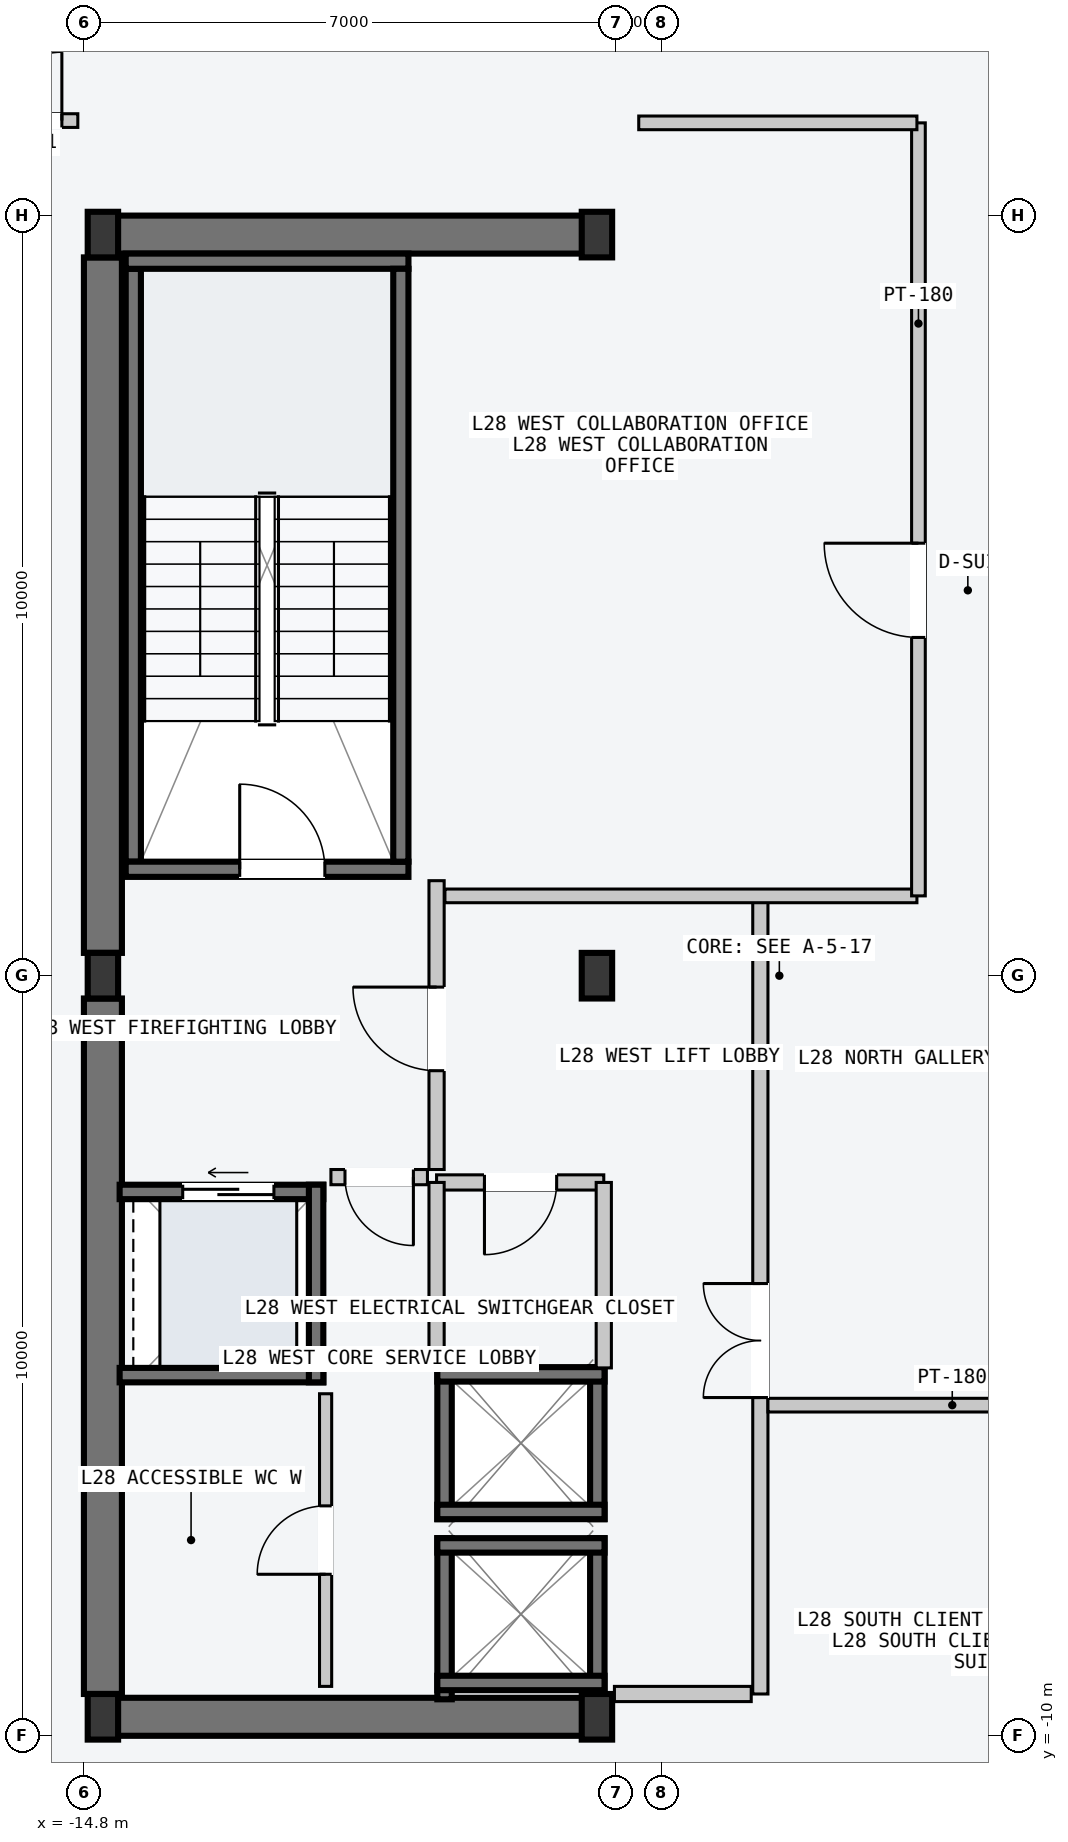
"""IFC4 building model, lengths in metres.
Left out: names, types, materials, properties, quantities, classifications, styles, units other than length and angle.
Written with IfcOpenShell. Run it as: python <this file> out.ifc"""

import sys

from ifc_helpers import new_model, si_unit, direction, frame, frame_2d, origin, origin_2d, place, context, subcontext, project, spatial, rectangle, i_section, extrude, element, fill, save


model = new_model("IFC4")
c1 = context("Model", 3, precision=1e-05, world=origin(), true_north=direction((0.0, 1.0)))
c2 = subcontext(c1, "Body", "Model", "MODEL_VIEW")
j1 = project(units=[si_unit("LENGTHUNIT", "METRE"), si_unit("PLANEANGLEUNIT", "RADIAN")], contexts=[c1])
p1 = place(None, origin())
s1 = spatial("IfcSite", under=j1, at=p1, CompositionType="ELEMENT")
p2 = place(p1, origin())
s2 = spatial("IfcBuilding", under=s1, at=p2, CompositionType="ELEMENT")
p3 = place(p2, frame((0.0, 0.0, 109.8)))
s3 = spatial("IfcBuildingStorey", under=s2, at=p3, CompositionType="ELEMENT", Elevation=109.8)
for number, where, z_axis, x_axis in (
    (1, (-14.53, -9.75, -0.2), (0.0, 0.0, 1.0), (1.0, 0.0, 0.0)),
    (2, (-14.53, 9.75, -0.2), (0.0, 0.0, 1.0), (1.0, 0.0, 0.0)),
):
    element("IfcWall", number, at=place(p3, frame(where, z_axis=z_axis, x_axis=x_axis)), inside=s3, PredefinedType="SHEAR", context=c2, shape_type="SweptSolid", body=[
        extrude(rectangle(XDim=6.46, YDim=0.5, at=frame_2d((3.23, 0.0))), origin(), (0.0, 0.0, 1.0), 3.6),
    ])
for number, where, z_axis, x_axis in (
    (3, (-14.55, -9.45, -0.2), (0.0, 0.0, 1.0), (0.0, 1.0, 0.0)),
    (4, (-14.55, 0.3, -0.2), (0.0, 0.0, 1.0), (0.0, 1.0, 0.0)),
):
    element("IfcWall", number, at=place(p3, frame(where, z_axis=z_axis, x_axis=x_axis)), inside=s3, PredefinedType="SHEAR", context=c2, shape_type="SweptSolid", body=[
        extrude(rectangle(XDim=9.15, YDim=0.5, at=frame_2d((4.575, 0.0))), origin(), (0.0, 0.0, 1.0), 3.6),
    ])
p4 = place(p3, frame((-14.15, 1.5, -0.2), z_axis=(0.0, 0.0, 1.0), x_axis=(0.0, 1.0, 0.0)))
e5 = element("IfcWall", 5, at=p4, inside=s3, PredefinedType="SOLIDWALL", context=c2, shape_type="SweptSolid", body=[
    extrude(rectangle(XDim=7.8, YDim=0.2, at=frame_2d((3.9, 0.0))), origin(), (0.0, 0.0, 1.0), 3.6),
])
p5 = place(p3, frame((-14.25, 1.4, -0.2), z_axis=(0.0, 0.0, 1.0), x_axis=(1.0, 0.0, 0.0)))
e6 = element("IfcWall", 6, at=p5, inside=s3, PredefinedType="SOLIDWALL", context=c2, shape_type="SweptSolid", body=[
    extrude(rectangle(XDim=3.72, YDim=0.2, at=frame_2d((1.86, 0.0))), origin(), (0.0, 0.0, 1.0), 3.6),
])
p6 = place(p5, frame((1.5, 0.0, 0.2)))
e7 = element("IfcOpeningElement", 7, at=p6, cuts=e6, PredefinedType="OPENING", context=c2, shape_type="SweptSolid", body=[
    extrude(rectangle(XDim=1.12, YDim=2.18, at=frame_2d((0.56, 1.09))), frame((0.0, 0.11, 0.0), z_axis=(0.0, -1.0, 0.0), x_axis=(1.0, 0.0, 0.0)), (0.0, 0.0, 1.0), 0.22),
])
p7 = place(p3, frame((-14.25, 9.4, -0.2), z_axis=(0.0, 0.0, 1.0), x_axis=(1.0, 0.0, 0.0)))
e8 = element("IfcWall", 8, at=p7, inside=s3, PredefinedType="SOLIDWALL", context=c2, shape_type="SweptSolid", body=[
    extrude(rectangle(XDim=3.72, YDim=0.2, at=frame_2d((1.86, 0.0))), origin(), (0.0, 0.0, 1.0), 3.6),
])
p8 = place(p3, frame((-10.63, 1.5, -0.2), z_axis=(0.0, 0.0, 1.0), x_axis=(0.0, 1.0, 0.0)))
e9 = element("IfcWall", 9, at=p8, inside=s3, PredefinedType="SOLIDWALL", context=c2, shape_type="SweptSolid", body=[
    extrude(rectangle(XDim=7.8, YDim=0.2, at=frame_2d((3.9, 0.0))), origin(), (0.0, 0.0, 1.0), 3.6),
])
for number, where, z_axis, x_axis in (
    (10, (-14.55, -9.75, 0.0), (0.0, 0.0, 1.0), (1.0, 0.0, 0.0)),
    (11, (-14.55, 0.0, 0.0), (0.0, 0.0, 1.0), (1.0, 0.0, 0.0)),
    (12, (-14.55, 9.75, 0.0), (0.0, 0.0, 1.0), (1.0, 0.0, 0.0)),
    (13, (-8.05, -9.75, 0.0), (0.0, 0.0, 1.0), (1.0, 0.0, 0.0)),
    (14, (-8.05, 0.0, 0.0), (0.0, 0.0, 1.0), (1.0, 0.0, 0.0)),
    (15, (-8.05, 9.75, 0.0), (0.0, 0.0, 1.0), (1.0, 0.0, 0.0)),
):
    element("IfcColumn", number, at=place(p3, frame(where, z_axis=z_axis, x_axis=x_axis)), inside=s3, PredefinedType="COLUMN", context=c2, shape_type="SweptSolid", body=[
        extrude(i_section(OverallWidth=0.4, OverallDepth=0.6, WebThickness=0.022, FlangeThickness=0.036, at=origin_2d()), origin(), (0.0, 0.0, 1.0), 3.6),
    ])
for number, where, z_axis, x_axis in (
    (16, (-8.045, -9.52, -0.2), (0.0, 0.0, 1.0), (0.0, 1.0, 0.0)),
    (17, (-10.055, -9.52, -0.2), (0.0, 0.0, 1.0), (0.0, 1.0, 0.0)),
):
    element("IfcWall", number, at=place(p3, frame(where, z_axis=z_axis, x_axis=x_axis)), inside=s3, PredefinedType="SOLIDWALL", context=c2, shape_type="SweptSolid", body=[
        extrude(rectangle(XDim=2.12, YDim=0.19, at=frame_2d((1.06, 0.0))), origin(), (0.0, 0.0, 1.0), 3.6),
    ])
for number, where, z_axis, x_axis in (
    (18, (-10.15, -7.495, -0.2), (0.0, 0.0, 1.0), (1.0, 0.0, 0.0)),
    (19, (-10.15, -9.305, -0.2), (0.0, 0.0, 1.0), (1.0, 0.0, 0.0)),
):
    element("IfcWall", number, at=place(p3, frame(where, z_axis=z_axis, x_axis=x_axis)), inside=s3, PredefinedType="SOLIDWALL", context=c2, shape_type="SweptSolid", body=[
        extrude(rectangle(XDim=2.2, YDim=0.19, at=frame_2d((1.1, 0.0))), origin(), (0.0, 0.0, 1.0), 3.6),
    ])
for number, where, z_axis, x_axis in (
    (20, (-8.045, -7.15, -0.2), (0.0, 0.0, 1.0), (0.0, 1.0, 0.0)),
    (21, (-10.055, -7.15, -0.2), (0.0, 0.0, 1.0), (0.0, 1.0, 0.0)),
):
    element("IfcWall", number, at=place(p3, frame(where, z_axis=z_axis, x_axis=x_axis)), inside=s3, PredefinedType="SOLIDWALL", context=c2, shape_type="SweptSolid", body=[
        extrude(rectangle(XDim=2.0, YDim=0.19, at=frame_2d((1.0, 0.0))), origin(), (0.0, 0.0, 1.0), 3.6),
    ])
for number, where, z_axis, x_axis in (
    (22, (-10.15, -5.245, -0.2), (0.0, 0.0, 1.0), (1.0, 0.0, 0.0)),
    (23, (-10.15, -7.055, -0.2), (0.0, 0.0, 1.0), (1.0, 0.0, 0.0)),
):
    element("IfcWall", number, at=place(p3, frame(where, z_axis=z_axis, x_axis=x_axis)), inside=s3, PredefinedType="SOLIDWALL", context=c2, shape_type="SweptSolid", body=[
        extrude(rectangle(XDim=2.2, YDim=0.19, at=frame_2d((1.1, 0.0))), origin(), (0.0, 0.0, 1.0), 3.6),
    ])
p9 = place(p3, frame((-14.33, -2.845, -0.2), z_axis=(0.0, 0.0, 1.0), x_axis=(1.0, 0.0, 0.0)))
e24 = element("IfcWall", 24, at=p9, inside=s3, PredefinedType="SOLIDWALL", context=c2, shape_type="SweptSolid", body=[
    extrude(rectangle(XDim=2.68, YDim=0.19, at=frame_2d((1.34, 0.0))), origin(), (0.0, 0.0, 1.0), 3.6),
])
p10 = place(p9, frame((0.83, 0.0, 0.2)))
e25 = element("IfcOpeningElement", 25, at=p10, cuts=e24, PredefinedType="OPENING", context=c2, shape_type="SweptSolid", body=[
    extrude(rectangle(XDim=1.2, YDim=2.2, at=frame_2d((0.6, 1.1))), frame((0.0, 0.105, 0.0), z_axis=(0.0, -1.0, 0.0), x_axis=(1.0, 0.0, 0.0)), (0.0, 0.0, 1.0), 0.21),
])
p11 = place(p3, frame((-14.33, -5.255, -0.2), z_axis=(0.0, 0.0, 1.0), x_axis=(1.0, 0.0, 0.0)))
e26 = element("IfcWall", 26, at=p11, inside=s3, PredefinedType="SOLIDWALL", context=c2, shape_type="SweptSolid", body=[
    extrude(rectangle(XDim=2.68, YDim=0.19, at=frame_2d((1.34, 0.0))), origin(), (0.0, 0.0, 1.0), 3.6),
])
p12 = place(p3, frame((-11.745, -5.35, -0.2), z_axis=(0.0, 0.0, 1.0), x_axis=(0.0, 1.0, 0.0)))
e27 = element("IfcWall", 27, at=p12, inside=s3, PredefinedType="SOLIDWALL", context=c2, shape_type="SweptSolid", body=[
    extrude(rectangle(XDim=2.6, YDim=0.19, at=frame_2d((1.3, 0.0))), origin(), (0.0, 0.0, 1.0), 3.6),
])
p13 = place(p3, frame((-5.9, -9.45, 0.0), z_axis=(0.0, 0.0, 1.0), x_axis=(0.0, 1.0, 0.0)))
e28 = element("IfcWall", 28, at=p13, inside=s3, PredefinedType="PARTITIONING", context=c2, shape_type="SweptSolid", body=[
    extrude(rectangle(XDim=10.5, YDim=0.2, at=frame_2d((5.25, 0.0))), origin(), (0.0, 0.0, 1.0), 3.4),
])
p14 = place(p13, frame((3.9, 0.0, 0.0)))
e29 = element("IfcOpeningElement", 29, at=p14, cuts=e28, PredefinedType="OPENING", context=c2, shape_type="SweptSolid", body=[
    extrude(rectangle(XDim=1.5, YDim=2.2, at=frame_2d((0.75, 1.1))), frame((0.0, 0.11, 0.0), z_axis=(0.0, -1.0, 0.0), x_axis=(1.0, 0.0, 0.0)), (0.0, 0.0, 1.0), 0.22),
])
p15 = place(p3, frame((-6.02, -9.45, 0.0), z_axis=(0.0, 0.0, 1.0), x_axis=(-1.0, 0.0, 0.0)))
e30 = element("IfcWall", 30, at=p15, inside=s3, PredefinedType="PARTITIONING", context=c2, shape_type="SweptSolid", body=[
    extrude(rectangle(XDim=1.8, YDim=0.2, at=frame_2d((0.9, 0.0))), origin(), (0.0, 0.0, 1.0), 3.4),
])
p16 = place(p3, frame((-10.16, -2.55, 0.0), z_axis=(0.0, 0.0, 1.0), x_axis=(0.0, 1.0, 0.0)))
e31 = element("IfcWall", 31, at=p16, inside=s3, PredefinedType="PARTITIONING", context=c2, shape_type="SweptSolid", body=[
    extrude(rectangle(XDim=3.8, YDim=0.2, at=frame_2d((1.9, 0.0))), origin(), (0.0, 0.0, 1.0), 3.4),
])
p17 = place(p16, frame((1.3, 0.0, 0.0)))
e32 = element("IfcOpeningElement", 32, at=p17, cuts=e31, PredefinedType="OPENING", context=c2, shape_type="SweptSolid", body=[
    extrude(rectangle(XDim=1.1, YDim=2.15, at=frame_2d((0.55, 1.075))), frame((0.0, 0.11, 0.0), z_axis=(0.0, -1.0, 0.0), x_axis=(1.0, 0.0, 0.0)), (0.0, 0.0, 1.0), 0.22),
])
p18 = place(p3, frame((-10.28, -2.65, 0.0), z_axis=(0.0, 0.0, 1.0), x_axis=(-1.0, 0.0, 0.0)))
e33 = element("IfcWall", 33, at=p18, inside=s3, PredefinedType="PARTITIONING", context=c2, shape_type="SweptSolid", body=[
    extrude(rectangle(XDim=1.27, YDim=0.2, at=frame_2d((0.635, 0.0))), origin(), (0.0, 0.0, 1.0), 3.4),
])
p19 = place(p18, frame((0.185, 0.0, 0.0)))
e34 = element("IfcOpeningElement", 34, at=p19, cuts=e33, PredefinedType="OPENING", context=c2, shape_type="SweptSolid", body=[
    extrude(rectangle(XDim=0.9, YDim=2.15, at=frame_2d((0.45, 1.075))), frame((0.0, 0.11, 0.0), z_axis=(0.0, -1.0, 0.0), x_axis=(1.0, 0.0, 0.0)), (0.0, 0.0, 1.0), 0.22),
])
p20 = place(p3, frame((-7.96, -2.72, 0.0), z_axis=(0.0, 0.0, 1.0), x_axis=(-1.0, 0.0, 0.0)))
e35 = element("IfcWall", 35, at=p20, inside=s3, PredefinedType="PARTITIONING", context=c2, shape_type="SweptSolid", body=[
    extrude(rectangle(XDim=2.2, YDim=0.2, at=frame_2d((1.1, 0.0))), origin(), (0.0, 0.0, 1.0), 3.4),
])
p21 = place(p20, frame((0.62, 0.0, 0.0)))
e36 = element("IfcOpeningElement", 36, at=p21, cuts=e35, PredefinedType="OPENING", context=c2, shape_type="SweptSolid", body=[
    extrude(rectangle(XDim=0.95, YDim=2.1, at=frame_2d((0.475, 1.05))), frame((0.0, 0.11, 0.0), z_axis=(0.0, -1.0, 0.0), x_axis=(1.0, 0.0, 0.0)), (0.0, 0.0, 1.0), 0.22),
])
for number, where, z_axis, x_axis in (
    (37, (-7.96, -5.16, 0.0), (0.0, 0.0, 1.0), (0.0, 1.0, 0.0)),
    (38, (-10.16, -5.16, 0.0), (0.0, 0.0, 1.0), (0.0, 1.0, 0.0)),
):
    element("IfcWall", number, at=place(p3, frame(where, z_axis=z_axis, x_axis=x_axis)), inside=s3, PredefinedType="PARTITIONING", context=c2, shape_type="SweptSolid", body=[
        extrude(rectangle(XDim=2.44, YDim=0.2, at=frame_2d((1.22, 0.0))), origin(), (0.0, 0.0, 1.0), 3.4),
    ])
p22 = place(p3, frame((-11.62, -9.35, 0.0), z_axis=(0.0, 0.0, 1.0), x_axis=(0.0, 1.0, 0.0)))
e39 = element("IfcWall", 39, at=p22, inside=s3, PredefinedType="PARTITIONING", context=c2, shape_type="SweptSolid", body=[
    extrude(rectangle(XDim=3.85, YDim=0.16, at=frame_2d((1.925, 0.0))), origin(), (0.0, 0.0, 1.0), 3.4),
])
p23 = place(p22, frame((1.475, 0.0, 0.0)))
e40 = element("IfcOpeningElement", 40, at=p23, cuts=e39, PredefinedType="OPENING", context=c2, shape_type="SweptSolid", body=[
    extrude(rectangle(XDim=0.9, YDim=2.15, at=frame_2d((0.45, 1.075))), frame((0.0, 0.09, 0.0), z_axis=(0.0, -1.0, 0.0), x_axis=(1.0, 0.0, 0.0)), (0.0, 0.0, 1.0), 0.18),
])
p24 = place(p3, frame((-10.05, 1.05, 0.0), z_axis=(0.0, 0.0, 1.0), x_axis=(1.0, 0.0, 0.0)))
e41 = element("IfcWall", 41, at=p24, inside=s3, PredefinedType="PARTITIONING", context=c2, shape_type="SweptSolid", body=[
    extrude(rectangle(XDim=6.21, YDim=0.18, at=frame_2d((3.105, 0.0))), origin(), (0.0, 0.0, 1.0), 3.4),
])
p25 = place(p3, frame((-3.82, 1.05, 0.0), z_axis=(0.0, 0.0, 1.0), x_axis=(0.0, 1.0, 0.0)))
e42 = element("IfcWall", 42, at=p25, inside=s3, PredefinedType="PARTITIONING", context=c2, shape_type="SweptSolid", body=[
    extrude(rectangle(XDim=10.17, YDim=0.18, at=frame_2d((5.085, 0.0))), origin(), (0.0, 0.0, 1.0), 3.4),
])
p26 = place(p25, frame((3.4, 0.0, 0.0)))
e43 = element("IfcOpeningElement", 43, at=p26, cuts=e42, PredefinedType="OPENING", context=c2, shape_type="SweptSolid", body=[
    extrude(rectangle(XDim=1.24, YDim=2.24, at=frame_2d((0.62, 1.12))), frame((0.0, 0.1, 0.0), z_axis=(0.0, -1.0, 0.0), x_axis=(1.0, 0.0, 0.0)), (0.0, 0.0, 1.0), 0.2),
])
p27 = place(p3, frame((-7.5, 11.22, 0.0), z_axis=(0.0, 0.0, 1.0), x_axis=(1.0, 0.0, 0.0)))
e44 = element("IfcWall", 44, at=p27, inside=s3, PredefinedType="PARTITIONING", context=c2, shape_type="SweptSolid", body=[
    extrude(rectangle(XDim=3.66, YDim=0.18, at=frame_2d((1.83, 0.0))), origin(), (0.0, 0.0, 1.0), 3.4),
])
p28 = place(p3, frame((-5.8, -5.65, 0.0), z_axis=(0.0, 0.0, 1.0), x_axis=(1.0, 0.0, 0.0)))
e45 = element("IfcWall", 45, at=p28, inside=s3, PredefinedType="PARTITIONING", context=c2, shape_type="SweptSolid", body=[
    extrude(rectangle(XDim=11.6, YDim=0.18, at=frame_2d((5.8, 0.0))), origin(), (0.0, 0.0, 1.0), 3.4),
])
p29 = place(p28, frame((5.1, 0.0, 0.0)))
e46 = element("IfcOpeningElement", 46, at=p29, cuts=e45, PredefinedType="OPENING", context=c2, shape_type="SweptSolid", body=[
    extrude(rectangle(XDim=1.4, YDim=2.2, at=frame_2d((0.7, 1.1))), frame((0.0, 0.1, 0.0), z_axis=(0.0, -1.0, 0.0), x_axis=(1.0, 0.0, 0.0)), (0.0, 0.0, 1.0), 0.2),
])
p30 = place(p3, frame((-16.2, 11.25, 0.0), z_axis=(0.0, 0.0, 1.0), x_axis=(1.0, 0.0, 0.0)))
e47 = element("IfcWall", 47, at=p30, inside=s3, PredefinedType="PARTITIONING", context=c2, shape_type="SweptSolid", body=[
    extrude(rectangle(XDim=1.32, YDim=0.18, at=frame_2d((0.66, 0.0))), origin(), (0.0, 0.0, 1.0), 3.4),
])
p31 = place(p30, frame((0.21, 0.0, 0.0)))
e48 = element("IfcOpeningElement", 48, at=p31, cuts=e47, PredefinedType="OPENING", context=c2, shape_type="SweptSolid", body=[
    extrude(rectangle(XDim=0.9, YDim=2.15, at=frame_2d((0.45, 1.075))), frame((0.0, 0.1, 0.0), z_axis=(0.0, -1.0, 0.0), x_axis=(1.0, 0.0, 0.0)), (0.0, 0.0, 1.0), 0.2),
])
p32 = place(p6, origin())
e49 = element("IfcDoor", 49, at=p32, inside=s3, OperationType="SINGLE_SWING_LEFT", PredefinedType="DOOR", context=c2, shape_type="SweptSolid", body=[
    extrude(rectangle(XDim=1.12, YDim=2.18, at=frame_2d((0.56, 1.09))), frame((0.0, 0.025, 0.0), z_axis=(0.0, -1.0, 0.0), x_axis=(1.0, 0.0, 0.0)), (0.0, 0.0, 1.0), 0.05),
])
fill(e7, e49)
p33 = place(p10, origin())
e50 = element("IfcDoor", 50, at=p33, inside=s3, OperationType="SLIDING_TO_LEFT", PredefinedType="DOOR", context=c2, shape_type="SweptSolid", body=[
    extrude(rectangle(XDim=1.2, YDim=2.2, at=frame_2d((0.6, 1.1))), frame((0.0, 0.025, 0.0), z_axis=(0.0, -1.0, 0.0), x_axis=(1.0, 0.0, 0.0)), (0.0, 0.0, 1.0), 0.05),
])
fill(e25, e50)
p34 = place(p14, origin())
e51 = element("IfcDoor", 51, at=p34, inside=s3, OperationType="DOUBLE_DOOR_SINGLE_SWING", PredefinedType="DOOR", context=c2, shape_type="SweptSolid", body=[
    extrude(rectangle(XDim=1.5, YDim=2.2, at=frame_2d((0.75, 1.1))), frame((0.0, 0.025, 0.0), z_axis=(0.0, -1.0, 0.0), x_axis=(1.0, 0.0, 0.0)), (0.0, 0.0, 1.0), 0.05),
])
fill(e29, e51)
p35 = place(p17, origin())
e52 = element("IfcDoor", 52, at=p35, inside=s3, OperationType="SINGLE_SWING_RIGHT", PredefinedType="DOOR", context=c2, shape_type="SweptSolid", body=[
    extrude(rectangle(XDim=1.1, YDim=2.15, at=frame_2d((0.55, 1.075))), frame((0.0, 0.025, 0.0), z_axis=(0.0, -1.0, 0.0), x_axis=(1.0, 0.0, 0.0)), (0.0, 0.0, 1.0), 0.05),
])
fill(e32, e52)
p36 = place(p19, origin())
e53 = element("IfcDoor", 53, at=p36, inside=s3, OperationType="SINGLE_SWING_LEFT", PredefinedType="DOOR", context=c2, shape_type="SweptSolid", body=[
    extrude(rectangle(XDim=0.9, YDim=2.15, at=frame_2d((0.45, 1.075))), frame((0.0, 0.025, 0.0), z_axis=(0.0, -1.0, 0.0), x_axis=(1.0, 0.0, 0.0)), (0.0, 0.0, 1.0), 0.05),
])
fill(e34, e53)
p37 = place(p21, origin())
e54 = element("IfcDoor", 54, at=p37, inside=s3, OperationType="SINGLE_SWING_RIGHT", PredefinedType="DOOR", context=c2, shape_type="SweptSolid", body=[
    extrude(rectangle(XDim=0.95, YDim=2.1, at=frame_2d((0.475, 1.05))), frame((0.0, 0.025, 0.0), z_axis=(0.0, -1.0, 0.0), x_axis=(1.0, 0.0, 0.0)), (0.0, 0.0, 1.0), 0.05),
])
fill(e36, e54)
p38 = place(p23, origin())
e55 = element("IfcDoor", 55, at=p38, inside=s3, OperationType="SINGLE_SWING_LEFT", PredefinedType="DOOR", context=c2, shape_type="SweptSolid", body=[
    extrude(rectangle(XDim=0.9, YDim=2.15, at=frame_2d((0.45, 1.075))), frame((0.0, 0.025, 0.0), z_axis=(0.0, -1.0, 0.0), x_axis=(1.0, 0.0, 0.0)), (0.0, 0.0, 1.0), 0.05),
])
fill(e40, e55)
p39 = place(p26, origin())
e56 = element("IfcDoor", 56, at=p39, inside=s3, OperationType="SINGLE_SWING_RIGHT", PredefinedType="DOOR", context=c2, shape_type="SweptSolid", body=[
    extrude(rectangle(XDim=1.24, YDim=2.24, at=frame_2d((0.62, 1.12))), frame((0.0, 0.025, 0.0), z_axis=(0.0, -1.0, 0.0), x_axis=(1.0, 0.0, 0.0)), (0.0, 0.0, 1.0), 0.05),
])
fill(e43, e56)
p40 = place(p31, origin())
e57 = element("IfcDoor", 57, at=p40, inside=s3, OperationType="SINGLE_SWING_RIGHT", PredefinedType="DOOR", context=c2, shape_type="SweptSolid", body=[
    extrude(rectangle(XDim=0.9, YDim=2.15, at=frame_2d((0.45, 1.075))), frame((0.0, 0.025, 0.0), z_axis=(0.0, -1.0, 0.0), x_axis=(1.0, 0.0, 0.0)), (0.0, 0.0, 1.0), 0.05),
])
fill(e48, e57)
save(model, sys.argv[1])
